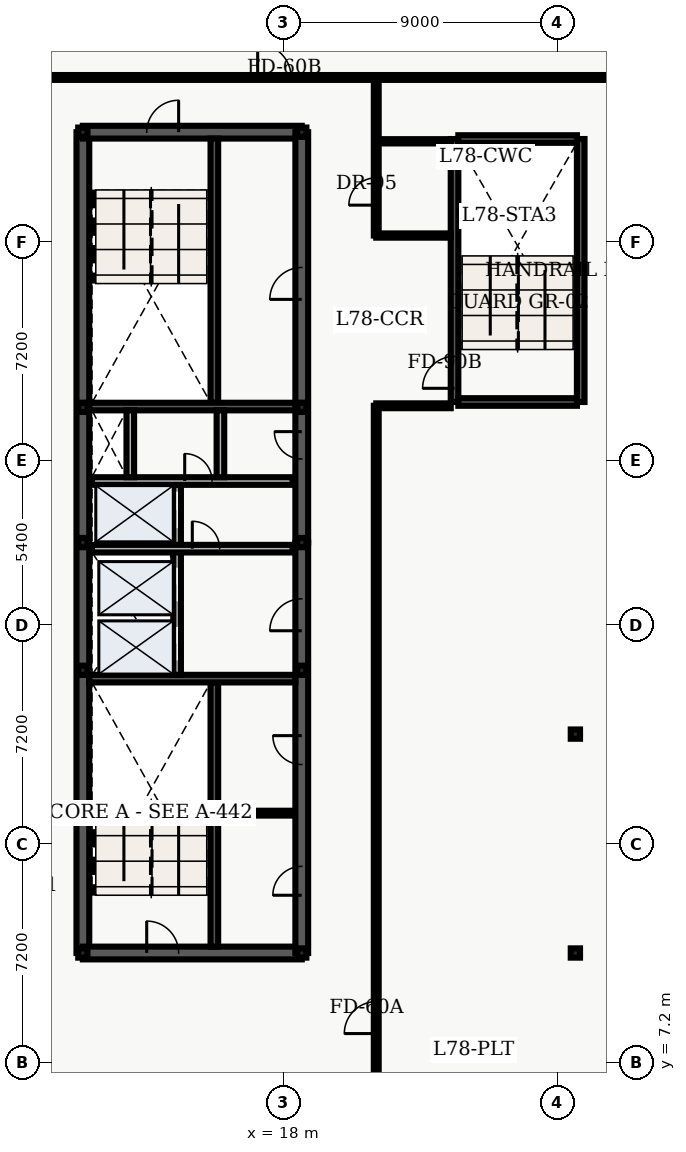
"""IFC4 building model, lengths in metres.
Left out: names, types, materials, properties, quantities, classifications, styles, units other than length and angle.
Written with IfcOpenShell. Run it as: python <this file> out.ifc"""

import sys

from ifc_helpers import new_model, entity, si_unit, converted_unit, direction, frame, origin_with_axes, origin_2d_with_axis, place, context, subcontext, project, spatial, polyline, rectangle, hollow_rectangle, outline, extrude, element, fill, save


model = new_model("IFC4")
c1 = context("Model", 3, precision=1e-05, world=origin_with_axes(), true_north=direction((0.0, 1.0)))
c2 = subcontext(c1, "Body", "Model", "MODEL_VIEW")
j1 = project(units=[si_unit("LENGTHUNIT", "METRE"), converted_unit("PLANEANGLEUNIT", "DEGREE", entity("IfcPlaneAngleMeasure", 0.017), si_unit("PLANEANGLEUNIT", "RADIAN"), dimensions=[0, 0, 0, 0, 0, 0, 0])], contexts=[c1])
p1 = place(None, origin_with_axes())
s1 = spatial("IfcSite", under=j1, at=p1, CompositionType="ELEMENT")
p2 = place(p1, origin_with_axes())
s2 = spatial("IfcBuilding", under=s1, at=p2, CompositionType="ELEMENT")
p3 = place(p2, frame((0.0, 0.0, 316.5), z_axis=(0.0, 0.0, 1.0), x_axis=(1.0, 0.0, 0.0)))
s3 = spatial("IfcBuildingStorey", under=s2, at=p3, CompositionType="ELEMENT", Elevation=316.5)
p4 = place(p3, frame((11.4, 10.8, 0.0), z_axis=(0.0, 0.0, 1.0), x_axis=(0.0, 1.0, 0.0)))
e1 = element("IfcWall", 1, at=p4, inside=s3, PredefinedType="SHEAR", context=c2, shape_type="SweptSolid", body=[
    extrude(outline(polyline([(0.0, -0.21), (27.0, -0.21), (27.0, 0.21), (0.0, 0.21), (0.0, -0.21)])), origin_with_axes(), (0.0, 0.0, 1.0), 3.64),
])
p5 = place(p3, frame((11.4, 10.8, 0.0), z_axis=(0.0, 0.0, 1.0), x_axis=(1.0, 0.0, 0.0)))
e2 = element("IfcWall", 2, at=p5, inside=s3, PredefinedType="SHEAR", context=c2, shape_type="SweptSolid", body=[
    extrude(outline(polyline([(0.0, -0.21), (7.2, -0.21), (7.2, 0.21), (0.0, 0.21), (0.0, -0.21)])), origin_with_axes(), (0.0, 0.0, 1.0), 3.64),
])
p6 = place(p5, frame((2.625, 0.0, 0.0), z_axis=(0.0, 0.0, 1.0), x_axis=(1.0, 0.0, 0.0)))
e3 = element("IfcOpeningElement", 3, at=p6, cuts=e2, PredefinedType="OPENING", context=c2, shape_type="SweptSolid", body=[
    extrude(rectangle(XDim=1.05, YDim=0.44, at=origin_2d_with_axis()), origin_with_axes(), (0.0, 0.0, 1.0), 2.15),
])
p7 = place(p3, frame((11.4, 37.8, 0.0), z_axis=(0.0, 0.0, 1.0), x_axis=(1.0, 0.0, 0.0)))
e4 = element("IfcWall", 4, at=p7, inside=s3, PredefinedType="SHEAR", context=c2, shape_type="SweptSolid", body=[
    extrude(outline(polyline([(0.0, -0.21), (7.2, -0.21), (7.2, 0.21), (0.0, 0.21), (0.0, -0.21)])), origin_with_axes(), (0.0, 0.0, 1.0), 3.64),
])
p8 = place(p7, frame((2.625, 0.0, 0.0), z_axis=(0.0, 0.0, 1.0), x_axis=(1.0, 0.0, 0.0)))
e5 = element("IfcOpeningElement", 5, at=p8, cuts=e4, PredefinedType="OPENING", context=c2, shape_type="SweptSolid", body=[
    extrude(rectangle(XDim=1.05, YDim=0.44, at=origin_2d_with_axis()), origin_with_axes(), (0.0, 0.0, 1.0), 2.15),
])
p9 = place(p3, frame((18.6, 10.8, 0.0), z_axis=(0.0, 0.0, 1.0), x_axis=(0.0, 1.0, 0.0)))
e6 = element("IfcWall", 6, at=p9, inside=s3, PredefinedType="SHEAR", context=c2, shape_type="SweptSolid", body=[
    extrude(outline(polyline([(0.0, -0.21), (13.5, -0.21), (13.5, 0.21), (0.0, 0.21), (0.0, -0.21)])), origin_with_axes(), (0.0, 0.0, 1.0), 3.64),
])
p10 = place(p9, frame((11.125, 0.0, 0.0), z_axis=(0.0, 0.0, 1.0), x_axis=(1.0, 0.0, 0.0)))
e7 = element("IfcOpeningElement", 7, at=p10, cuts=e6, PredefinedType="OPENING", context=c2, shape_type="SweptSolid", body=[
    extrude(rectangle(XDim=1.05, YDim=0.44, at=origin_2d_with_axis()), origin_with_axes(), (0.0, 0.0, 1.0), 2.15),
])
p11 = place(p9, frame((2.375, 0.0, 0.0), z_axis=(0.0, 0.0, 1.0), x_axis=(1.0, 0.0, 0.0)))
e8 = element("IfcOpeningElement", 8, at=p11, cuts=e6, PredefinedType="OPENING", context=c2, shape_type="SweptSolid", body=[
    extrude(rectangle(XDim=0.95, YDim=0.44, at=origin_2d_with_axis()), origin_with_axes(), (0.0, 0.0, 1.0), 2.15),
])
p12 = place(p9, frame((6.675, 0.0, 0.0), z_axis=(0.0, 0.0, 1.0), x_axis=(1.0, 0.0, 0.0)))
e9 = element("IfcOpeningElement", 9, at=p12, cuts=e6, PredefinedType="OPENING", context=c2, shape_type="SweptSolid", body=[
    extrude(rectangle(XDim=0.95, YDim=0.44, at=origin_2d_with_axis()), origin_with_axes(), (0.0, 0.0, 1.0), 2.15),
])
p13 = place(p3, frame((18.6, 24.3, 0.0), z_axis=(0.0, 0.0, 1.0), x_axis=(0.0, 1.0, 0.0)))
e10 = element("IfcWall", 10, at=p13, inside=s3, PredefinedType="SHEAR", context=c2, shape_type="SweptSolid", body=[
    extrude(outline(polyline([(0.0, -0.21), (13.5, -0.21), (13.5, 0.21), (0.0, 0.21), (0.0, -0.21)])), origin_with_axes(), (0.0, 0.0, 1.0), 3.64),
])
p14 = place(p13, frame((3.2, 0.0, 0.0), z_axis=(0.0, 0.0, 1.0), x_axis=(1.0, 0.0, 0.0)))
e11 = element("IfcOpeningElement", 11, at=p14, cuts=e10, PredefinedType="OPENING", context=c2, shape_type="SweptSolid", body=[
    extrude(rectangle(XDim=0.9, YDim=0.44, at=origin_2d_with_axis()), origin_with_axes(), (0.0, 0.0, 1.0), 2.15),
])
p15 = place(p13, frame((8.525, 0.0, 0.0), z_axis=(0.0, 0.0, 1.0), x_axis=(1.0, 0.0, 0.0)))
e12 = element("IfcOpeningElement", 12, at=p15, cuts=e10, PredefinedType="OPENING", context=c2, shape_type="SweptSolid", body=[
    extrude(rectangle(XDim=1.05, YDim=0.44, at=origin_2d_with_axis()), origin_with_axes(), (0.0, 0.0, 1.0), 2.15),
])
p16 = place(p3, frame((15.725, 11.01, 0.0), z_axis=(0.0, 0.0, 1.0), x_axis=(0.0, 1.0, 0.0)))
e13 = element("IfcWall", 13, at=p16, inside=s3, PredefinedType="SHEAR", context=c2, shape_type="SweptSolid", body=[
    extrude(outline(polyline([(0.0, -0.125), (8.69, -0.125), (8.69, 0.125), (0.0, 0.125), (0.0, -0.125)])), origin_with_axes(), (0.0, 0.0, 1.0), 3.64),
])
p17 = place(p3, frame((11.61, 19.825, 0.0), z_axis=(0.0, 0.0, 1.0), x_axis=(1.0, 0.0, 0.0)))
e14 = element("IfcWall", 14, at=p17, inside=s3, PredefinedType="SHEAR", context=c2, shape_type="SweptSolid", body=[
    extrude(outline(polyline([(0.0, -0.125), (6.78, -0.125), (6.78, 0.125), (0.0, 0.125), (0.0, -0.125)])), origin_with_axes(), (0.0, 0.0, 1.0), 3.64),
])
p18 = place(p3, frame((15.725, 28.9, 0.0), z_axis=(0.0, 0.0, 1.0), x_axis=(0.0, 1.0, 0.0)))
e15 = element("IfcWall", 15, at=p18, inside=s3, PredefinedType="SHEAR", context=c2, shape_type="SweptSolid", body=[
    extrude(outline(polyline([(0.0, -0.125), (8.69, -0.125), (8.69, 0.125), (0.0, 0.125), (0.0, -0.125)])), origin_with_axes(), (0.0, 0.0, 1.0), 3.64),
])
p19 = place(p3, frame((11.61, 28.775, 0.0), z_axis=(0.0, 0.0, 1.0), x_axis=(1.0, 0.0, 0.0)))
e16 = element("IfcWall", 16, at=p19, inside=s3, PredefinedType="SHEAR", context=c2, shape_type="SweptSolid", body=[
    extrude(outline(polyline([(0.0, -0.125), (6.78, -0.125), (6.78, 0.125), (0.0, 0.125), (0.0, -0.125)])), origin_with_axes(), (0.0, 0.0, 1.0), 3.64),
])
p20 = place(p3, frame((14.5, 19.95, 0.0), z_axis=(0.0, 0.0, 1.0), x_axis=(0.0, 1.0, 0.0)))
e17 = element("IfcWall", 17, at=p20, inside=s3, PredefinedType="SOLIDWALL", context=c2, shape_type="SweptSolid", body=[
    extrude(outline(polyline([(0.0, -0.125), (6.25, -0.125), (6.25, 0.125), (0.0, 0.125), (0.0, -0.125)])), origin_with_axes(), (0.0, 0.0, 1.0), 2.68),
])
p21 = place(p20, frame((1.025, 0.0, 0.0), z_axis=(0.0, 0.0, 1.0), x_axis=(1.0, 0.0, 0.0)))
e18 = element("IfcOpeningElement", 18, at=p21, cuts=e17, PredefinedType="OPENING", context=c2, shape_type="SweptSolid", body=[
    extrude(rectangle(XDim=1.1, YDim=0.27, at=origin_2d_with_axis()), origin_with_axes(), (0.0, 0.0, 1.0), 2.15),
])
p22 = place(p20, frame((2.975, 0.0, 0.0), z_axis=(0.0, 0.0, 1.0), x_axis=(1.0, 0.0, 0.0)))
e19 = element("IfcOpeningElement", 19, at=p22, cuts=e17, PredefinedType="OPENING", context=c2, shape_type="SweptSolid", body=[
    extrude(rectangle(XDim=1.1, YDim=0.27, at=origin_2d_with_axis()), origin_with_axes(), (0.0, 0.0, 1.0), 2.15),
])
p23 = place(p20, frame((5.425, 0.0, 0.0), z_axis=(0.0, 0.0, 1.0), x_axis=(1.0, 0.0, 0.0)))
e20 = element("IfcOpeningElement", 20, at=p23, cuts=e17, PredefinedType="OPENING", context=c2, shape_type="SweptSolid", body=[
    extrude(rectangle(XDim=1.2, YDim=0.27, at=origin_2d_with_axis()), origin_with_axes(), (0.0, 0.0, 1.0), 2.15),
])
p24 = place(p3, frame((11.7, 24.1, 0.0), z_axis=(0.0, 0.0, 1.0), x_axis=(1.0, 0.0, 0.0)))
e21 = element("IfcWall", 21, at=p24, inside=s3, PredefinedType="SOLIDWALL", context=c2, shape_type="SweptSolid", body=[
    extrude(outline(polyline([(0.0, -0.125), (6.6, -0.125), (6.6, 0.125), (0.0, 0.125), (0.0, -0.125)])), origin_with_axes(), (0.0, 0.0, 1.0), 2.68),
])
p25 = place(p24, frame((3.75, 0.0, 0.0), z_axis=(0.0, 0.0, 1.0), x_axis=(1.0, 0.0, 0.0)))
e22 = element("IfcOpeningElement", 22, at=p25, cuts=e21, PredefinedType="OPENING", context=c2, shape_type="SweptSolid", body=[
    extrude(rectangle(XDim=0.9, YDim=0.27, at=origin_2d_with_axis()), origin_with_axes(), (0.0, 0.0, 1.0), 2.15),
])
p26 = place(p3, frame((11.7, 26.325, 0.0), z_axis=(0.0, 0.0, 1.0), x_axis=(1.0, 0.0, 0.0)))
e23 = element("IfcWall", 23, at=p26, inside=s3, PredefinedType="SOLIDWALL", context=c2, shape_type="SweptSolid", body=[
    extrude(outline(polyline([(0.0, -0.125), (6.6, -0.125), (6.6, 0.125), (0.0, 0.125), (0.0, -0.125)])), origin_with_axes(), (0.0, 0.0, 1.0), 2.68),
])
p27 = place(p26, frame((3.5, 0.0, 0.0), z_axis=(0.0, 0.0, 1.0), x_axis=(1.0, 0.0, 0.0)))
e24 = element("IfcOpeningElement", 24, at=p27, cuts=e23, PredefinedType="OPENING", context=c2, shape_type="SweptSolid", body=[
    extrude(rectangle(XDim=0.9, YDim=0.27, at=origin_2d_with_axis()), origin_with_axes(), (0.0, 0.0, 1.0), 2.15),
])
for number, where, z_axis, x_axis in (
    (25, (12.96, 26.45, 0.0), (0.0, 0.0, 1.0), (0.0, 1.0, 0.0)),
    (26, (15.925, 26.45, 0.0), (0.0, 0.0, 1.0), (0.0, 1.0, 0.0)),
):
    element("IfcWall", number, at=place(p3, frame(where, z_axis=z_axis, x_axis=x_axis)), inside=s3, PredefinedType="SOLIDWALL", context=c2, shape_type="SweptSolid", body=[
        extrude(outline(polyline([(0.0, -0.125), (2.2, -0.125), (2.2, 0.125), (0.0, 0.125), (0.0, -0.125)])), origin_with_axes(), (0.0, 0.0, 1.0), 2.68),
    ])
p28 = place(p3, frame((23.625, 28.925, 0.0), z_axis=(0.0, 0.0, 1.0), x_axis=(0.0, 1.0, 0.0)))
e27 = element("IfcWall", 27, at=p28, inside=s3, PredefinedType="SHEAR", context=c2, shape_type="SweptSolid", body=[
    extrude(outline(polyline([(0.0, -0.125), (8.65, -0.125), (8.65, 0.125), (0.0, 0.125), (0.0, -0.125)])), origin_with_axes(), (0.0, 0.0, 1.0), 3.64),
])
p29 = place(p28, frame((0.975, 0.0, 0.0), z_axis=(0.0, 0.0, 1.0), x_axis=(1.0, 0.0, 0.0)))
e28 = element("IfcOpeningElement", 28, at=p29, cuts=e27, PredefinedType="OPENING", context=c2, shape_type="SweptSolid", body=[
    extrude(rectangle(XDim=1.05, YDim=0.27, at=origin_2d_with_axis()), origin_with_axes(), (0.0, 0.0, 1.0), 2.15),
])
p30 = place(p3, frame((27.775, 28.925, 0.0), z_axis=(0.0, 0.0, 1.0), x_axis=(0.0, 1.0, 0.0)))
e29 = element("IfcWall", 29, at=p30, inside=s3, PredefinedType="SHEAR", context=c2, shape_type="SweptSolid", body=[
    extrude(outline(polyline([(0.0, -0.125), (8.65, -0.125), (8.65, 0.125), (0.0, 0.125), (0.0, -0.125)])), origin_with_axes(), (0.0, 0.0, 1.0), 3.64),
])
for number, where, z_axis, x_axis in (
    (30, (23.75, 28.925, 0.0), (0.0, 0.0, 1.0), (1.0, 0.0, 0.0)),
    (31, (23.75, 37.575, 0.0), (0.0, 0.0, 1.0), (1.0, 0.0, 0.0)),
):
    element("IfcWall", number, at=place(p3, frame(where, z_axis=z_axis, x_axis=x_axis)), inside=s3, PredefinedType="SHEAR", context=c2, shape_type="SweptSolid", body=[
        extrude(outline(polyline([(0.0, -0.125), (3.9, -0.125), (3.9, 0.125), (0.0, 0.125), (0.0, -0.125)])), origin_with_axes(), (0.0, 0.0, 1.0), 3.64),
    ])
for number, where, z_axis, x_axis in (
    (32, (11.4, 10.8, 0.0), (0.0, 0.0, 1.0), (1.0, 0.0, 0.0)),
    (33, (11.4, 20.1, 0.0), (0.0, 0.0, 1.0), (1.0, 0.0, 0.0)),
    (34, (11.4, 24.3, 0.0), (0.0, 0.0, 1.0), (1.0, 0.0, 0.0)),
    (35, (11.4, 28.75, 0.0), (0.0, 0.0, 1.0), (1.0, 0.0, 0.0)),
    (36, (11.4, 37.8, 0.0), (0.0, 0.0, 1.0), (1.0, 0.0, 0.0)),
    (37, (18.6, 10.8, 0.0), (0.0, 0.0, 1.0), (1.0, 0.0, 0.0)),
    (38, (18.6, 20.1, 0.0), (0.0, 0.0, 1.0), (1.0, 0.0, 0.0)),
    (39, (18.6, 24.3, 0.0), (0.0, 0.0, 1.0), (1.0, 0.0, 0.0)),
    (40, (18.6, 28.75, 0.0), (0.0, 0.0, 1.0), (1.0, 0.0, 0.0)),
    (41, (18.6, 37.8, 0.0), (0.0, 0.0, 1.0), (1.0, 0.0, 0.0)),
    (42, (27.6, 10.8, 0.0), (0.0, 0.0, 1.0), (1.0, 0.0, 0.0)),
    (43, (27.6, 18.0, 0.0), (0.0, 0.0, 1.0), (1.0, 0.0, 0.0)),
):
    element("IfcColumn", number, at=place(p3, frame(where, z_axis=z_axis, x_axis=x_axis)), inside=s3, PredefinedType="COLUMN", context=c2, shape_type="SweptSolid", body=[
        extrude(hollow_rectangle(XDim=0.305, YDim=0.305, WallThickness=0.015, InnerFilletRadius=0.015, OuterFilletRadius=0.03, at=origin_2d_with_axis()), origin_with_axes(), (0.0, 0.0, 1.0), 3.9),
    ])
p31 = place(p3, frame((15.84, 15.4, 0.0), z_axis=(0.0, 0.0, 1.0), x_axis=(1.0, 0.0, 0.0)))
e44 = element("IfcWall", 44, at=p31, inside=s3, PredefinedType="PARTITIONING", context=c2, shape_type="SweptSolid", body=[
    extrude(outline(polyline([(0.0, -0.08), (2.46, -0.08), (2.46, 0.08), (0.0, 0.08), (0.0, -0.08)])), origin_with_axes(), (0.0, 0.0, 1.0), 2.68),
])
for number, where, z_axis, x_axis in (
    (45, (21.05, 34.4, 0.0), (0.0, 0.0, 1.0), (1.0, 0.0, 0.0)),
    (46, (21.05, 37.5, 0.0), (0.0, 0.0, 1.0), (1.0, 0.0, 0.0)),
):
    element("IfcWall", number, at=place(p3, frame(where, z_axis=z_axis, x_axis=x_axis)), inside=s3, PredefinedType="PARTITIONING", context=c2, shape_type="SweptSolid", body=[
        extrude(outline(polyline([(0.0, -0.07), (2.45, -0.07), (2.45, 0.07), (0.0, 0.07), (0.0, -0.07)])), origin_with_axes(), (0.0, 0.0, 1.0), 2.68),
    ])
p32 = place(p3, frame((21.05, 3.895, 0.0), z_axis=(0.0, 0.0, 1.0), x_axis=(0.0, 1.0, 0.0)))
e47 = element("IfcWall", 47, at=p32, inside=s3, PredefinedType="PARTITIONING", context=c2, shape_type="SweptSolid", body=[
    extrude(outline(polyline([(0.0, -0.08), (24.905, -0.08), (24.905, 0.08), (0.0, 0.08), (0.0, -0.08)])), origin_with_axes(), (0.0, 0.0, 1.0), 2.68),
])
p33 = place(p32, frame((4.78, 0.0, 0.0), z_axis=(0.0, 0.0, 1.0), x_axis=(1.0, 0.0, 0.0)))
e48 = element("IfcOpeningElement", 48, at=p33, cuts=e47, PredefinedType="OPENING", context=c2, shape_type="SweptSolid", body=[
    extrude(rectangle(XDim=1.05, YDim=0.18, at=origin_2d_with_axis()), origin_with_axes(), (0.0, 0.0, 1.0), 2.15),
])
p34 = place(p3, frame((21.05, 34.4, 0.0), z_axis=(0.0, 0.0, 1.0), x_axis=(0.0, 1.0, 0.0)))
e49 = element("IfcWall", 49, at=p34, inside=s3, PredefinedType="PARTITIONING", context=c2, shape_type="SweptSolid", body=[
    extrude(outline(polyline([(0.0, -0.08), (5.2, -0.08), (5.2, 0.08), (0.0, 0.08), (0.0, -0.08)])), origin_with_axes(), (0.0, 0.0, 1.0), 2.68),
])
p35 = place(p34, frame((1.45, 0.0, 0.0), z_axis=(0.0, 0.0, 1.0), x_axis=(1.0, 0.0, 0.0)))
e50 = element("IfcOpeningElement", 50, at=p35, cuts=e49, PredefinedType="OPENING", context=c2, shape_type="SweptSolid", body=[
    extrude(rectangle(XDim=0.9, YDim=0.18, at=origin_2d_with_axis()), origin_with_axes(), (0.0, 0.0, 1.0), 2.15),
])
p36 = place(p3, frame((21.05, 28.8, 0.0), z_axis=(0.0, 0.0, 1.0), x_axis=(1.0, 0.0, 0.0)))
e51 = element("IfcWall", 51, at=p36, inside=s3, PredefinedType="PARTITIONING", context=c2, shape_type="SweptSolid", body=[
    extrude(outline(polyline([(0.0, -0.08), (2.45, -0.08), (2.45, 0.08), (0.0, 0.08), (0.0, -0.08)])), origin_with_axes(), (0.0, 0.0, 1.0), 2.68),
])
p37 = place(p3, frame((9.895, 39.6, 0.0), z_axis=(0.0, 0.0, 1.0), x_axis=(1.0, 0.0, 0.0)))
e52 = element("IfcWall", 52, at=p37, inside=s3, PredefinedType="PARTITIONING", context=c2, shape_type="SweptSolid", body=[
    extrude(outline(polyline([(0.0, -0.08), (22.21, -0.08), (22.21, 0.08), (0.0, 0.08), (0.0, -0.08)])), origin_with_axes(), (0.0, 0.0, 1.0), 2.68),
])
p38 = place(p37, frame((7.805, 0.0, 0.0), z_axis=(0.0, 0.0, 1.0), x_axis=(1.0, 0.0, 0.0)))
e53 = element("IfcOpeningElement", 53, at=p38, cuts=e52, PredefinedType="OPENING", context=c2, shape_type="SweptSolid", body=[
    extrude(rectangle(XDim=1.1, YDim=0.18, at=origin_2d_with_axis()), origin_with_axes(), (0.0, 0.0, 1.0), 2.15),
])
p39 = place(p20, frame((1.025, 0.0, 0.0), z_axis=(0.0, 0.0, 1.0), x_axis=(1.0, 0.0, 0.0)))
e54 = element("IfcDoor", 54, at=p39, inside=s3, OperationType="SLIDING_TO_LEFT", PredefinedType="DOOR", context=c2, shape_type="SweptSolid", body=[
    extrude(rectangle(XDim=1.1, YDim=0.09, at=origin_2d_with_axis()), origin_with_axes(), (0.0, 0.0, 1.0), 2.15),
])
fill(e18, e54)
p40 = place(p20, frame((2.975, 0.0, 0.0), z_axis=(0.0, 0.0, 1.0), x_axis=(1.0, 0.0, 0.0)))
e55 = element("IfcDoor", 55, at=p40, inside=s3, OperationType="SLIDING_TO_RIGHT", PredefinedType="DOOR", context=c2, shape_type="SweptSolid", body=[
    extrude(rectangle(XDim=1.1, YDim=0.09, at=origin_2d_with_axis()), origin_with_axes(), (0.0, 0.0, 1.0), 2.15),
])
fill(e19, e55)
p41 = place(p20, frame((5.425, 0.0, 0.0), z_axis=(0.0, 0.0, 1.0), x_axis=(1.0, 0.0, 0.0)))
e56 = element("IfcDoor", 56, at=p41, inside=s3, OperationType="DOUBLE_DOOR_SLIDING", PredefinedType="DOOR", context=c2, shape_type="SweptSolid", body=[
    extrude(rectangle(XDim=1.2, YDim=0.09, at=origin_2d_with_axis()), origin_with_axes(), (0.0, 0.0, 1.0), 2.15),
])
fill(e20, e56)
p42 = place(p13, frame((3.2, 0.0, 0.0), z_axis=(0.0, 0.0, 1.0), x_axis=(1.0, 0.0, 0.0)))
e57 = element("IfcDoor", 57, at=p42, inside=s3, OperationType="SINGLE_SWING_RIGHT", PredefinedType="DOOR", context=c2, shape_type="SweptSolid", body=[
    extrude(rectangle(XDim=0.9, YDim=0.09, at=origin_2d_with_axis()), origin_with_axes(), (0.0, 0.0, 1.0), 2.15),
])
fill(e11, e57)
p43 = place(p5, frame((2.625, 0.0, 0.0), z_axis=(0.0, 0.0, 1.0), x_axis=(1.0, 0.0, 0.0)))
e58 = element("IfcDoor", 58, at=p43, inside=s3, OperationType="SINGLE_SWING_LEFT", PredefinedType="DOOR", context=c2, shape_type="SweptSolid", body=[
    extrude(rectangle(XDim=1.05, YDim=0.09, at=origin_2d_with_axis()), origin_with_axes(), (0.0, 0.0, 1.0), 2.15),
])
fill(e3, e58)
p44 = place(p7, frame((2.625, 0.0, 0.0), z_axis=(0.0, 0.0, 1.0), x_axis=(1.0, 0.0, 0.0)))
e59 = element("IfcDoor", 59, at=p44, inside=s3, OperationType="SINGLE_SWING_RIGHT", PredefinedType="DOOR", context=c2, shape_type="SweptSolid", body=[
    extrude(rectangle(XDim=1.05, YDim=0.09, at=origin_2d_with_axis()), origin_with_axes(), (0.0, 0.0, 1.0), 2.15),
])
fill(e5, e59)
p45 = place(p9, frame((11.125, 0.0, 0.0), z_axis=(0.0, 0.0, 1.0), x_axis=(1.0, 0.0, 0.0)))
e60 = element("IfcDoor", 60, at=p45, inside=s3, OperationType="SINGLE_SWING_LEFT", PredefinedType="DOOR", context=c2, shape_type="SweptSolid", body=[
    extrude(rectangle(XDim=1.05, YDim=0.09, at=origin_2d_with_axis()), origin_with_axes(), (0.0, 0.0, 1.0), 2.15),
])
fill(e7, e60)
p46 = place(p24, frame((3.75, 0.0, 0.0), z_axis=(0.0, 0.0, 1.0), x_axis=(1.0, 0.0, 0.0)))
e61 = element("IfcDoor", 61, at=p46, inside=s3, OperationType="SINGLE_SWING_LEFT", PredefinedType="DOOR", context=c2, shape_type="SweptSolid", body=[
    extrude(rectangle(XDim=0.9, YDim=0.09, at=origin_2d_with_axis()), origin_with_axes(), (0.0, 0.0, 1.0), 2.15),
])
fill(e22, e61)
p47 = place(p26, frame((3.5, 0.0, 0.0), z_axis=(0.0, 0.0, 1.0), x_axis=(1.0, 0.0, 0.0)))
e62 = element("IfcDoor", 62, at=p47, inside=s3, OperationType="SINGLE_SWING_LEFT", PredefinedType="DOOR", context=c2, shape_type="SweptSolid", body=[
    extrude(rectangle(XDim=0.9, YDim=0.09, at=origin_2d_with_axis()), origin_with_axes(), (0.0, 0.0, 1.0), 2.15),
])
fill(e24, e62)
p48 = place(p9, frame((2.375, 0.0, 0.0), z_axis=(0.0, 0.0, 1.0), x_axis=(1.0, 0.0, 0.0)))
e63 = element("IfcDoor", 63, at=p48, inside=s3, OperationType="SINGLE_SWING_LEFT", PredefinedType="DOOR", context=c2, shape_type="SweptSolid", body=[
    extrude(rectangle(XDim=0.95, YDim=0.09, at=origin_2d_with_axis()), origin_with_axes(), (0.0, 0.0, 1.0), 2.15),
])
fill(e8, e63)
p49 = place(p9, frame((6.675, 0.0, 0.0), z_axis=(0.0, 0.0, 1.0), x_axis=(1.0, 0.0, 0.0)))
e64 = element("IfcDoor", 64, at=p49, inside=s3, OperationType="SINGLE_SWING_RIGHT", PredefinedType="DOOR", context=c2, shape_type="SweptSolid", body=[
    extrude(rectangle(XDim=0.95, YDim=0.09, at=origin_2d_with_axis()), origin_with_axes(), (0.0, 0.0, 1.0), 2.15),
])
fill(e9, e64)
p50 = place(p13, frame((8.525, 0.0, 0.0), z_axis=(0.0, 0.0, 1.0), x_axis=(1.0, 0.0, 0.0)))
e65 = element("IfcDoor", 65, at=p50, inside=s3, OperationType="SINGLE_SWING_LEFT", PredefinedType="DOOR", context=c2, shape_type="SweptSolid", body=[
    extrude(rectangle(XDim=1.05, YDim=0.09, at=origin_2d_with_axis()), origin_with_axes(), (0.0, 0.0, 1.0), 2.15),
])
fill(e12, e65)
p51 = place(p28, frame((0.975, 0.0, 0.0), z_axis=(0.0, 0.0, 1.0), x_axis=(1.0, 0.0, 0.0)))
e66 = element("IfcDoor", 66, at=p51, inside=s3, OperationType="SINGLE_SWING_LEFT", PredefinedType="DOOR", context=c2, shape_type="SweptSolid", body=[
    extrude(rectangle(XDim=1.05, YDim=0.09, at=origin_2d_with_axis()), origin_with_axes(), (0.0, 0.0, 1.0), 2.15),
])
fill(e28, e66)
p52 = place(p34, frame((1.45, 0.0, 0.0), z_axis=(0.0, 0.0, 1.0), x_axis=(1.0, 0.0, 0.0)))
e67 = element("IfcDoor", 67, at=p52, inside=s3, OperationType="SINGLE_SWING_LEFT", PredefinedType="DOOR", context=c2, shape_type="SweptSolid", body=[
    extrude(rectangle(XDim=0.9, YDim=0.09, at=origin_2d_with_axis()), origin_with_axes(), (0.0, 0.0, 1.0), 2.15),
])
fill(e50, e67)
p53 = place(p32, frame((4.78, 0.0, 0.0), z_axis=(0.0, 0.0, 1.0), x_axis=(1.0, 0.0, 0.0)))
e68 = element("IfcDoor", 68, at=p53, inside=s3, OperationType="SINGLE_SWING_LEFT", PredefinedType="DOOR", context=c2, shape_type="SweptSolid", body=[
    extrude(rectangle(XDim=1.05, YDim=0.09, at=origin_2d_with_axis()), origin_with_axes(), (0.0, 0.0, 1.0), 2.15),
])
fill(e48, e68)
p54 = place(p37, frame((7.805, 0.0, 0.0), z_axis=(0.0, 0.0, 1.0), x_axis=(1.0, 0.0, 0.0)))
e69 = element("IfcDoor", 69, at=p54, inside=s3, OperationType="SINGLE_SWING_LEFT", PredefinedType="DOOR", context=c2, shape_type="SweptSolid", body=[
    extrude(rectangle(XDim=1.1, YDim=0.09, at=origin_2d_with_axis()), origin_with_axes(), (0.0, 0.0, 1.0), 2.15),
])
fill(e53, e69)
save(model, sys.argv[1])
